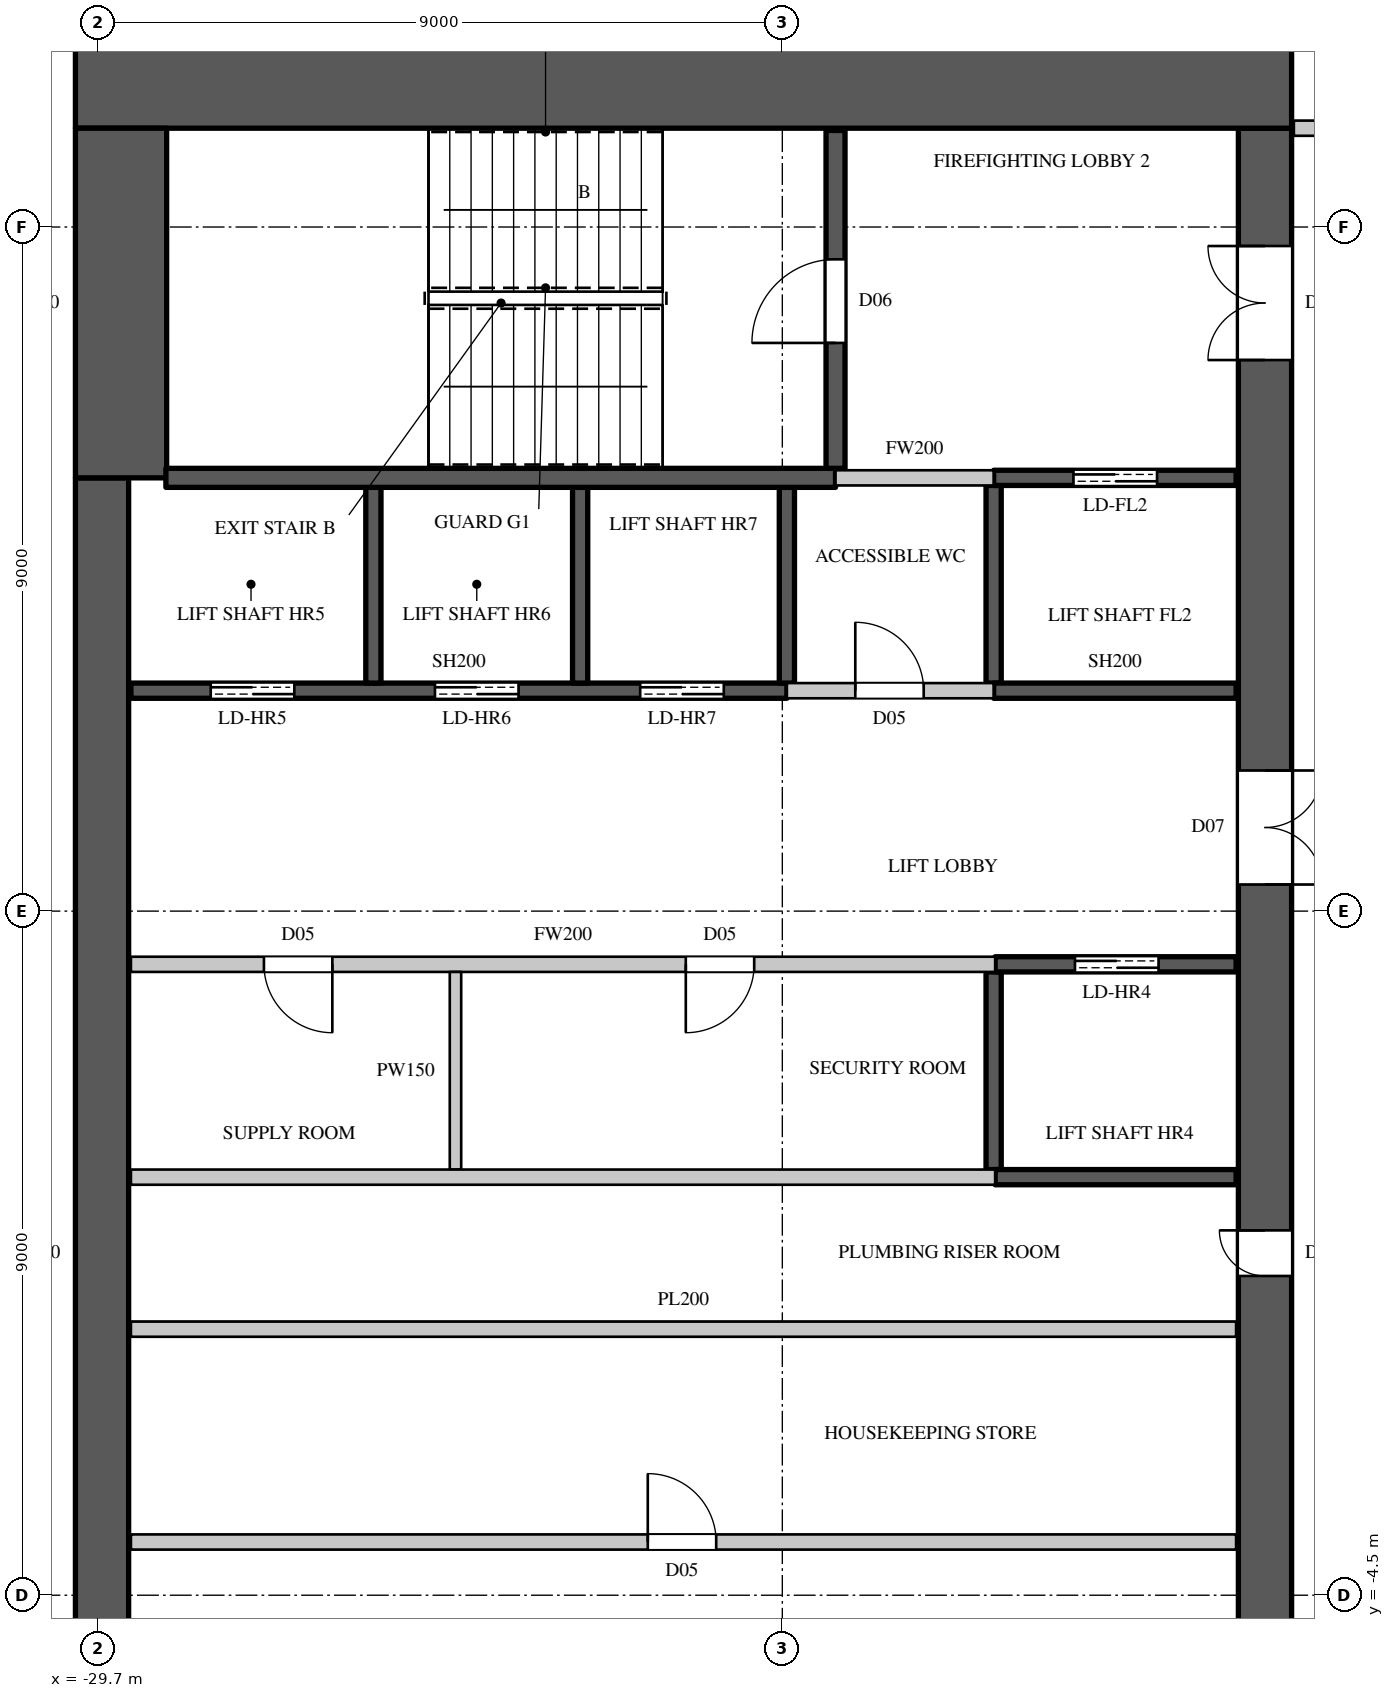
"""IFC4 building model, lengths in metres.
Left out: names, types, materials, properties, quantities, classifications, styles, units other than length and angle.
Written with IfcOpenShell. Run it as: python <this file> out.ifc"""

import sys

from ifc_helpers import new_model, si_unit, direction, frame, frame_2d, origin, place, context, subcontext, project, spatial, rectangle, extrude, element, fill, save


model = new_model("IFC4")
c1 = context("Model", 3, precision=1e-05, world=origin(), true_north=direction((0.0, 1.0)))
c2 = subcontext(c1, "Body", "Model", "MODEL_VIEW")
j1 = project(units=[si_unit("LENGTHUNIT", "METRE"), si_unit("PLANEANGLEUNIT", "RADIAN")], contexts=[c1])
p1 = place(None, origin())
s1 = spatial("IfcSite", under=j1, at=p1, CompositionType="ELEMENT")
p2 = place(p1, origin())
s2 = spatial("IfcBuilding", under=s1, at=p2, CompositionType="ELEMENT")
p3 = place(p2, frame((0.0, 0.0, 263.9)))
s3 = spatial("IfcBuildingStorey", under=s2, at=p3, CompositionType="ELEMENT", Elevation=263.9)
p4 = place(p3, frame((-30.0, 15.4, 0.0), z_axis=(0.0, 0.0, 1.0), x_axis=(1.0, 0.0, 0.0)))
e1 = element("IfcWall", 1, at=p4, inside=s3, PredefinedType="SHEAR", context=c2, shape_type="SweptSolid", body=[
    extrude(rectangle(XDim=16.0, YDim=1.2, at=frame_2d((8.0, 0.0))), origin(), (0.0, 0.0, 1.0), 4.1),
])
p5 = place(p3, frame((-14.35, -14.8, 0.0), z_axis=(0.0, 0.0, 1.0), x_axis=(0.0, 1.0, 0.0)))
e2 = element("IfcWall", 2, at=p5, inside=s3, PredefinedType="SHEAR", context=c2, shape_type="SweptSolid", body=[
    extrude(rectangle(XDim=29.6, YDim=0.7, at=frame_2d((14.8, 0.0))), origin(), (0.0, 0.0, 1.0), 4.1),
])
p6 = place(p5, frame((1.55, 0.0, 0.0)))
e3 = element("IfcOpeningElement", 3, at=p6, cuts=e2, PredefinedType="OPENING", context=c2, shape_type="SweptSolid", body=[
    extrude(rectangle(XDim=1.5, YDim=2.4, at=frame_2d((0.75, 1.2))), frame((0.0, 0.36, 0.0), z_axis=(0.0, -1.0, 0.0), x_axis=(1.0, 0.0, 0.0)), (0.0, 0.0, 1.0), 0.72),
])
p7 = place(p5, frame((26.55, 0.0, 0.0)))
e4 = element("IfcOpeningElement", 4, at=p7, cuts=e2, PredefinedType="OPENING", context=c2, shape_type="SweptSolid", body=[
    extrude(rectangle(XDim=1.5, YDim=2.4, at=frame_2d((0.75, 1.2))), frame((0.0, 0.36, 0.0), z_axis=(0.0, -1.0, 0.0), x_axis=(1.0, 0.0, 0.0)), (0.0, 0.0, 1.0), 0.72),
])
p8 = place(p5, frame((8.45, 0.0, 0.0)))
e5 = element("IfcOpeningElement", 5, at=p8, cuts=e2, PredefinedType="OPENING", context=c2, shape_type="SweptSolid", body=[
    extrude(rectangle(XDim=1.5, YDim=2.4, at=frame_2d((0.75, 1.2))), frame((0.0, 0.36, 0.0), z_axis=(0.0, -1.0, 0.0), x_axis=(1.0, 0.0, 0.0)), (0.0, 0.0, 1.0), 0.72),
])
p9 = place(p5, frame((19.65, 0.0, 0.0)))
e6 = element("IfcOpeningElement", 6, at=p9, cuts=e2, PredefinedType="OPENING", context=c2, shape_type="SweptSolid", body=[
    extrude(rectangle(XDim=1.5, YDim=2.4, at=frame_2d((0.75, 1.2))), frame((0.0, 0.36, 0.0), z_axis=(0.0, -1.0, 0.0), x_axis=(1.0, 0.0, 0.0)), (0.0, 0.0, 1.0), 0.72),
])
p10 = place(p5, frame((14.5, 0.0, 0.0)))
e7 = element("IfcOpeningElement", 7, at=p10, cuts=e2, PredefinedType="OPENING", context=c2, shape_type="SweptSolid", body=[
    extrude(rectangle(XDim=0.6, YDim=2.0, at=frame_2d((0.3, 1.0))), frame((0.0, 0.36, 0.0), z_axis=(0.0, -1.0, 0.0), x_axis=(1.0, 0.0, 0.0)), (0.0, 0.0, 1.0), 0.72),
])
p11 = place(p3, frame((-29.65, -10.2, 0.0), z_axis=(0.0, 0.0, 1.0), x_axis=(0.0, 1.0, 0.0)))
e8 = element("IfcWall", 8, at=p11, inside=s3, PredefinedType="SHEAR", context=c2, shape_type="SweptSolid", body=[
    extrude(rectangle(XDim=20.4, YDim=0.7, at=frame_2d((10.2, 0.0))), origin(), (0.0, 0.0, 1.0), 4.1),
])
p12 = place(p3, frame((-29.4, 10.2, 0.0), z_axis=(0.0, 0.0, 1.0), x_axis=(0.0, 1.0, 0.0)))
e9 = element("IfcWall", 9, at=p12, inside=s3, PredefinedType="SHEAR", context=c2, shape_type="SweptSolid", body=[
    extrude(rectangle(XDim=4.6, YDim=1.2, at=frame_2d((2.3, 0.0))), origin(), (0.0, 0.0, 1.0), 4.1),
])
p13 = place(p3, frame((-29.27, -3.8, 0.0), z_axis=(0.0, 0.0, 1.0), x_axis=(1.0, 0.0, 0.0)))
e10 = element("IfcWall", 10, at=p13, inside=s3, PredefinedType="PARTITIONING", context=c2, shape_type="SweptSolid", body=[
    extrude(rectangle(XDim=14.54, YDim=0.2, at=frame_2d((7.27, 0.0))), origin(), (0.0, 0.0, 1.0), 3.8),
])
p14 = place(p13, frame((6.8, 0.0, 0.0)))
e11 = element("IfcOpeningElement", 11, at=p14, cuts=e10, PredefinedType="OPENING", context=c2, shape_type="SweptSolid", body=[
    extrude(rectangle(XDim=0.9, YDim=2.2, at=frame_2d((0.45, 1.1))), frame((0.0, 0.11, 0.0), z_axis=(0.0, -1.0, 0.0), x_axis=(1.0, 0.0, 0.0)), (0.0, 0.0, 1.0), 0.22),
])
p15 = place(p3, frame((-29.27, 3.8, 0.0), z_axis=(0.0, 0.0, 1.0), x_axis=(1.0, 0.0, 0.0)))
e12 = element("IfcWall", 12, at=p15, inside=s3, PredefinedType="PARTITIONING", context=c2, shape_type="SweptSolid", body=[
    extrude(rectangle(XDim=11.37, YDim=0.2, at=frame_2d((5.685, 0.0))), origin(), (0.0, 0.0, 1.0), 3.8),
])
p16 = place(p15, frame((1.75, 0.0, 0.0)))
e13 = element("IfcOpeningElement", 13, at=p16, cuts=e12, PredefinedType="OPENING", context=c2, shape_type="SweptSolid", body=[
    extrude(rectangle(XDim=0.9, YDim=2.2, at=frame_2d((0.45, 1.1))), frame((0.0, 0.11, 0.0), z_axis=(0.0, -1.0, 0.0), x_axis=(1.0, 0.0, 0.0)), (0.0, 0.0, 1.0), 0.22),
])
p17 = place(p15, frame((7.3, 0.0, 0.0)))
e14 = element("IfcOpeningElement", 14, at=p17, cuts=e12, PredefinedType="OPENING", context=c2, shape_type="SweptSolid", body=[
    extrude(rectangle(XDim=0.9, YDim=2.2, at=frame_2d((0.45, 1.1))), frame((0.0, 0.11, 0.0), z_axis=(0.0, -1.0, 0.0), x_axis=(1.0, 0.0, 0.0)), (0.0, 0.0, 1.0), 0.22),
])
p18 = place(p3, frame((-20.64, 7.4, 0.0), z_axis=(0.0, 0.0, 1.0), x_axis=(1.0, 0.0, 0.0)))
e15 = element("IfcWall", 15, at=p18, inside=s3, PredefinedType="PARTITIONING", context=c2, shape_type="SweptSolid", body=[
    extrude(rectangle(XDim=2.72, YDim=0.2, at=frame_2d((1.36, 0.0))), origin(), (0.0, 0.0, 1.0), 3.8),
])
p19 = place(p18, frame((0.9, 0.0, 0.0)))
e16 = element("IfcOpeningElement", 16, at=p19, cuts=e15, PredefinedType="OPENING", context=c2, shape_type="SweptSolid", body=[
    extrude(rectangle(XDim=0.9, YDim=2.2, at=frame_2d((0.45, 1.1))), frame((0.0, 0.11, 0.0), z_axis=(0.0, -1.0, 0.0), x_axis=(1.0, 0.0, 0.0)), (0.0, 0.0, 1.0), 0.22),
])
p20 = place(p3, frame((-20.0, 10.2, 0.0), z_axis=(0.0, 0.0, 1.0), x_axis=(1.0, 0.0, 0.0)))
e17 = element("IfcWall", 17, at=p20, inside=s3, PredefinedType="PARTITIONING", context=c2, shape_type="SweptSolid", body=[
    extrude(rectangle(XDim=2.08, YDim=0.2, at=frame_2d((1.04, 0.0))), origin(), (0.0, 0.0, 1.0), 3.8),
])
p21 = place(p3, frame((-13.97, 14.8, 0.0), z_axis=(0.0, 0.0, 1.0), x_axis=(1.0, 0.0, 0.0)))
e18 = element("IfcWall", 18, at=p21, inside=s3, PredefinedType="PARTITIONING", context=c2, shape_type="SweptSolid", body=[
    extrude(rectangle(XDim=3.07, YDim=0.2, at=frame_2d((1.535, 0.0))), origin(), (0.0, 0.0, 1.0), 3.8),
])
p22 = place(p3, frame((-25.0, 1.1, 0.0), z_axis=(0.0, 0.0, 1.0), x_axis=(0.0, 1.0, 0.0)))
e19 = element("IfcWall", 19, at=p22, inside=s3, PredefinedType="PARTITIONING", context=c2, shape_type="SweptSolid", body=[
    extrude(rectangle(XDim=2.6, YDim=0.15, at=frame_2d((1.3, 0.0))), origin(), (0.0, 0.0, 1.0), 3.8),
])
p23 = place(p3, frame((-29.27, -1.0, 0.0), z_axis=(0.0, 0.0, 1.0), x_axis=(1.0, 0.0, 0.0)))
e20 = element("IfcWall", 20, at=p23, inside=s3, PredefinedType="PARTITIONING", context=c2, shape_type="SweptSolid", body=[
    extrude(rectangle(XDim=14.54, YDim=0.2, at=frame_2d((7.27, 0.0))), origin(), (0.0, 0.0, 1.0), 3.8),
])
p24 = place(p3, frame((-29.27, 1.0, 0.0), z_axis=(0.0, 0.0, 1.0), x_axis=(1.0, 0.0, 0.0)))
e21 = element("IfcWall", 21, at=p24, inside=s3, PredefinedType="PARTITIONING", context=c2, shape_type="SweptSolid", body=[
    extrude(rectangle(XDim=11.37, YDim=0.2, at=frame_2d((5.685, 0.0))), origin(), (0.0, 0.0, 1.0), 3.8),
])
p25 = place(p3, frame((-29.27, 7.4, 0.0), z_axis=(0.0, 0.0, 1.0), x_axis=(1.0, 0.0, 0.0)))
e22 = element("IfcWall", 22, at=p25, inside=s3, PredefinedType="SHEAR", context=c2, shape_type="SweptSolid", body=[
    extrude(rectangle(XDim=8.63, YDim=0.2, at=frame_2d((4.315, 0.0))), origin(), (0.0, 0.0, 1.0), 3.8),
])
p26 = place(p25, frame((1.05, 0.0, 0.0)))
e23 = element("IfcOpeningElement", 23, at=p26, cuts=e22, PredefinedType="OPENING", context=c2, shape_type="SweptSolid", body=[
    extrude(rectangle(XDim=1.1, YDim=2.2, at=frame_2d((0.55, 1.1))), frame((0.0, 0.11, 0.0), z_axis=(0.0, -1.0, 0.0), x_axis=(1.0, 0.0, 0.0)), (0.0, 0.0, 1.0), 0.22),
])
p27 = place(p25, frame((4.0, 0.0, 0.0)))
e24 = element("IfcOpeningElement", 24, at=p27, cuts=e22, PredefinedType="OPENING", context=c2, shape_type="SweptSolid", body=[
    extrude(rectangle(XDim=1.1, YDim=2.2, at=frame_2d((0.55, 1.1))), frame((0.0, 0.11, 0.0), z_axis=(0.0, -1.0, 0.0), x_axis=(1.0, 0.0, 0.0)), (0.0, 0.0, 1.0), 0.22),
])
p28 = place(p25, frame((6.7, 0.0, 0.0)))
e25 = element("IfcOpeningElement", 25, at=p28, cuts=e22, PredefinedType="OPENING", context=c2, shape_type="SweptSolid", body=[
    extrude(rectangle(XDim=1.1, YDim=2.2, at=frame_2d((0.55, 1.1))), frame((0.0, 0.11, 0.0), z_axis=(0.0, -1.0, 0.0), x_axis=(1.0, 0.0, 0.0)), (0.0, 0.0, 1.0), 0.22),
])
for number, where, z_axis, x_axis in (
    (26, (-26.08, 7.5, 0.0), (0.0, 0.0, 1.0), (0.0, 1.0, 0.0)),
    (27, (-23.36, 7.5, 0.0), (0.0, 0.0, 1.0), (0.0, 1.0, 0.0)),
):
    element("IfcWall", number, at=place(p3, frame(where, z_axis=z_axis, x_axis=x_axis)), inside=s3, PredefinedType="SHEAR", context=c2, shape_type="SweptSolid", body=[
        extrude(rectangle(XDim=2.575, YDim=0.2, at=frame_2d((1.288, 0.0))), origin(), (0.0, 0.0, 1.0), 4.1),
    ])
p29 = place(p3, frame((-20.64, 7.5, 0.0), z_axis=(0.0, 0.0, 1.0), x_axis=(0.0, 1.0, 0.0)))
e28 = element("IfcWall", 28, at=p29, inside=s3, PredefinedType="SHEAR", context=c2, shape_type="SweptSolid", body=[
    extrude(rectangle(XDim=2.575, YDim=0.2, at=frame_2d((1.288, 0.0))), origin(), (0.0, 0.0, 1.0), 3.8),
])
p30 = place(p3, frame((-17.92, 1.1, 0.0), z_axis=(0.0, 0.0, 1.0), x_axis=(0.0, 1.0, 0.0)))
e29 = element("IfcWall", 29, at=p30, inside=s3, PredefinedType="SHEAR", context=c2, shape_type="SweptSolid", body=[
    extrude(rectangle(XDim=2.6, YDim=0.2, at=frame_2d((1.3, 0.0))), origin(), (0.0, 0.0, 1.0), 3.8),
])
p31 = place(p3, frame((-17.9, 1.0, 0.0), z_axis=(0.0, 0.0, 1.0), x_axis=(1.0, 0.0, 0.0)))
e30 = element("IfcWall", 30, at=p31, inside=s3, PredefinedType="SHEAR", context=c2, shape_type="SweptSolid", body=[
    extrude(rectangle(XDim=3.17, YDim=0.2, at=frame_2d((1.585, 0.0))), origin(), (0.0, 0.0, 1.0), 3.8),
])
p32 = place(p3, frame((-17.9, 3.8, 0.0), z_axis=(0.0, 0.0, 1.0), x_axis=(1.0, 0.0, 0.0)))
e31 = element("IfcWall", 31, at=p32, inside=s3, PredefinedType="SHEAR", context=c2, shape_type="SweptSolid", body=[
    extrude(rectangle(XDim=3.17, YDim=0.2, at=frame_2d((1.585, 0.0))), origin(), (0.0, 0.0, 1.0), 3.8),
])
p33 = place(p32, frame((1.05, 0.0, 0.0)))
e32 = element("IfcOpeningElement", 32, at=p33, cuts=e31, PredefinedType="OPENING", context=c2, shape_type="SweptSolid", body=[
    extrude(rectangle(XDim=1.1, YDim=2.2, at=frame_2d((0.55, 1.1))), frame((0.0, 0.11, 0.0), z_axis=(0.0, -1.0, 0.0), x_axis=(1.0, 0.0, 0.0)), (0.0, 0.0, 1.0), 0.22),
])
p34 = place(p3, frame((-17.92, 7.5, 0.0), z_axis=(0.0, 0.0, 1.0), x_axis=(0.0, 1.0, 0.0)))
e33 = element("IfcWall", 33, at=p34, inside=s3, PredefinedType="SHEAR", context=c2, shape_type="SweptSolid", body=[
    extrude(rectangle(XDim=2.6, YDim=0.2, at=frame_2d((1.3, 0.0))), origin(), (0.0, 0.0, 1.0), 3.8),
])
p35 = place(p3, frame((-17.92, 7.4, 0.0), z_axis=(0.0, 0.0, 1.0), x_axis=(1.0, 0.0, 0.0)))
e34 = element("IfcWall", 34, at=p35, inside=s3, PredefinedType="SHEAR", context=c2, shape_type="SweptSolid", body=[
    extrude(rectangle(XDim=3.19, YDim=0.2, at=frame_2d((1.595, 0.0))), origin(), (0.0, 0.0, 1.0), 3.8),
])
p36 = place(p3, frame((-17.92, 10.2, 0.0), z_axis=(0.0, 0.0, 1.0), x_axis=(1.0, 0.0, 0.0)))
e35 = element("IfcWall", 35, at=p36, inside=s3, PredefinedType="SHEAR", context=c2, shape_type="SweptSolid", body=[
    extrude(rectangle(XDim=3.19, YDim=0.2, at=frame_2d((1.595, 0.0))), origin(), (0.0, 0.0, 1.0), 3.8),
])
p37 = place(p36, frame((1.05, 0.0, 0.0)))
e36 = element("IfcOpeningElement", 36, at=p37, cuts=e35, PredefinedType="OPENING", context=c2, shape_type="SweptSolid", body=[
    extrude(rectangle(XDim=1.1, YDim=2.2, at=frame_2d((0.55, 1.1))), frame((0.0, 0.11, 0.0), z_axis=(0.0, -1.0, 0.0), x_axis=(1.0, 0.0, 0.0)), (0.0, 0.0, 1.0), 0.22),
])
p38 = place(p3, frame((-28.81, 10.2, 0.0), z_axis=(0.0, 0.0, 1.0), x_axis=(1.0, 0.0, 0.0)))
e37 = element("IfcWall", 37, at=p38, inside=s3, PredefinedType="SHEAR", context=c2, shape_type="SweptSolid", body=[
    extrude(rectangle(XDim=8.81, YDim=0.25, at=frame_2d((4.405, 0.0))), origin(), (0.0, 0.0, 1.0), 3.8),
])
p39 = place(p3, frame((-20.0, 10.325, 0.0), z_axis=(0.0, 0.0, 1.0), x_axis=(0.0, 1.0, 0.0)))
e38 = element("IfcWall", 38, at=p39, inside=s3, PredefinedType="SHEAR", context=c2, shape_type="SweptSolid", body=[
    extrude(rectangle(XDim=4.445, YDim=0.25, at=frame_2d((2.223, 0.0))), origin(), (0.0, 0.0, 1.0), 3.8),
])
p40 = place(p39, frame((1.65, 0.0, 0.0)))
e39 = element("IfcOpeningElement", 39, at=p40, cuts=e38, PredefinedType="OPENING", context=c2, shape_type="SweptSolid", body=[
    extrude(rectangle(XDim=1.1, YDim=2.2, at=frame_2d((0.55, 1.1))), frame((0.0, 0.135, 0.0), z_axis=(0.0, -1.0, 0.0), x_axis=(1.0, 0.0, 0.0)), (0.0, 0.0, 1.0), 0.27),
])
p41 = place(p40, origin())
e40 = element("IfcDoor", 40, at=p41, inside=s3, OperationType="SINGLE_SWING_LEFT", PredefinedType="DOOR", context=c2, shape_type="SweptSolid", body=[
    extrude(rectangle(XDim=1.1, YDim=2.2, at=frame_2d((0.55, 1.1))), frame((0.0, 0.025, 0.0), z_axis=(0.0, -1.0, 0.0), x_axis=(1.0, 0.0, 0.0)), (0.0, 0.0, 1.0), 0.05),
])
fill(e39, e40)
p42 = place(p14, origin())
e41 = element("IfcDoor", 41, at=p42, inside=s3, OperationType="SINGLE_SWING_LEFT", PredefinedType="DOOR", context=c2, shape_type="SweptSolid", body=[
    extrude(rectangle(XDim=0.9, YDim=2.2, at=frame_2d((0.45, 1.1))), frame((0.0, 0.025, 0.0), z_axis=(0.0, -1.0, 0.0), x_axis=(1.0, 0.0, 0.0)), (0.0, 0.0, 1.0), 0.05),
])
fill(e11, e41)
p43 = place(p16, origin())
e42 = element("IfcDoor", 42, at=p43, inside=s3, OperationType="SINGLE_SWING_LEFT", PredefinedType="DOOR", context=c2, shape_type="SweptSolid", body=[
    extrude(rectangle(XDim=0.9, YDim=2.2, at=frame_2d((0.45, 1.1))), frame((0.0, 0.025, 0.0), z_axis=(0.0, -1.0, 0.0), x_axis=(1.0, 0.0, 0.0)), (0.0, 0.0, 1.0), 0.05),
])
fill(e13, e42)
p44 = place(p17, origin())
e43 = element("IfcDoor", 43, at=p44, inside=s3, OperationType="SINGLE_SWING_RIGHT", PredefinedType="DOOR", context=c2, shape_type="SweptSolid", body=[
    extrude(rectangle(XDim=0.9, YDim=2.2, at=frame_2d((0.45, 1.1))), frame((0.0, 0.025, 0.0), z_axis=(0.0, -1.0, 0.0), x_axis=(1.0, 0.0, 0.0)), (0.0, 0.0, 1.0), 0.05),
])
fill(e14, e43)
p45 = place(p19, origin())
e44 = element("IfcDoor", 44, at=p45, inside=s3, OperationType="SINGLE_SWING_LEFT", PredefinedType="DOOR", context=c2, shape_type="SweptSolid", body=[
    extrude(rectangle(XDim=0.9, YDim=2.2, at=frame_2d((0.45, 1.1))), frame((0.0, 0.025, 0.0), z_axis=(0.0, -1.0, 0.0), x_axis=(1.0, 0.0, 0.0)), (0.0, 0.0, 1.0), 0.05),
])
fill(e16, e44)
p46 = place(p33, origin())
e45 = element("IfcDoor", 45, at=p46, inside=s3, OperationType="DOUBLE_DOOR_SLIDING", PredefinedType="DOOR", context=c2, shape_type="SweptSolid", body=[
    extrude(rectangle(XDim=1.1, YDim=2.2, at=frame_2d((0.55, 1.1))), frame((0.0, 0.025, 0.0), z_axis=(0.0, -1.0, 0.0), x_axis=(1.0, 0.0, 0.0)), (0.0, 0.0, 1.0), 0.05),
])
fill(e32, e45)
p47 = place(p26, origin())
e46 = element("IfcDoor", 46, at=p47, inside=s3, OperationType="DOUBLE_DOOR_SLIDING", PredefinedType="DOOR", context=c2, shape_type="SweptSolid", body=[
    extrude(rectangle(XDim=1.1, YDim=2.2, at=frame_2d((0.55, 1.1))), frame((0.0, 0.025, 0.0), z_axis=(0.0, -1.0, 0.0), x_axis=(1.0, 0.0, 0.0)), (0.0, 0.0, 1.0), 0.05),
])
fill(e23, e46)
p48 = place(p27, origin())
e47 = element("IfcDoor", 47, at=p48, inside=s3, OperationType="DOUBLE_DOOR_SLIDING", PredefinedType="DOOR", context=c2, shape_type="SweptSolid", body=[
    extrude(rectangle(XDim=1.1, YDim=2.2, at=frame_2d((0.55, 1.1))), frame((0.0, 0.025, 0.0), z_axis=(0.0, -1.0, 0.0), x_axis=(1.0, 0.0, 0.0)), (0.0, 0.0, 1.0), 0.05),
])
fill(e24, e47)
p49 = place(p28, origin())
e48 = element("IfcDoor", 48, at=p49, inside=s3, OperationType="DOUBLE_DOOR_SLIDING", PredefinedType="DOOR", context=c2, shape_type="SweptSolid", body=[
    extrude(rectangle(XDim=1.1, YDim=2.2, at=frame_2d((0.55, 1.1))), frame((0.0, 0.025, 0.0), z_axis=(0.0, -1.0, 0.0), x_axis=(1.0, 0.0, 0.0)), (0.0, 0.0, 1.0), 0.05),
])
fill(e25, e48)
p50 = place(p37, origin())
e49 = element("IfcDoor", 49, at=p50, inside=s3, OperationType="DOUBLE_DOOR_SLIDING", PredefinedType="DOOR", context=c2, shape_type="SweptSolid", body=[
    extrude(rectangle(XDim=1.1, YDim=2.2, at=frame_2d((0.55, 1.1))), frame((0.0, 0.025, 0.0), z_axis=(0.0, -1.0, 0.0), x_axis=(1.0, 0.0, 0.0)), (0.0, 0.0, 1.0), 0.05),
])
fill(e36, e49)
p51 = place(p7, origin())
e50 = element("IfcDoor", 50, at=p51, inside=s3, OperationType="DOUBLE_DOOR_SINGLE_SWING", PredefinedType="DOOR", context=c2, shape_type="SweptSolid", body=[
    extrude(rectangle(XDim=1.5, YDim=2.4, at=frame_2d((0.75, 1.2))), frame((0.0, 0.345, 0.0), z_axis=(0.0, -1.0, 0.0), x_axis=(1.0, 0.0, 0.0)), (0.0, 0.0, 1.0), 0.05),
])
fill(e4, e50)
p52 = place(p9, origin())
e51 = element("IfcDoor", 51, at=p52, inside=s3, OperationType="DOUBLE_DOOR_SINGLE_SWING", PredefinedType="DOOR", context=c2, shape_type="SweptSolid", body=[
    extrude(rectangle(XDim=1.5, YDim=2.4, at=frame_2d((0.75, 1.2))), frame((0.0, -0.295, 0.0), z_axis=(0.0, -1.0, 0.0), x_axis=(1.0, 0.0, 0.0)), (0.0, 0.0, 1.0), 0.05),
])
fill(e6, e51)
p53 = place(p10, origin())
e52 = element("IfcDoor", 52, at=p53, inside=s3, OperationType="SINGLE_SWING_RIGHT", PredefinedType="DOOR", context=c2, shape_type="SweptSolid", body=[
    extrude(rectangle(XDim=0.6, YDim=2.0, at=frame_2d((0.3, 1.0))), frame((0.0, 0.345, 0.0), z_axis=(0.0, -1.0, 0.0), x_axis=(1.0, 0.0, 0.0)), (0.0, 0.0, 1.0), 0.05),
])
fill(e7, e52)
save(model, sys.argv[1])
